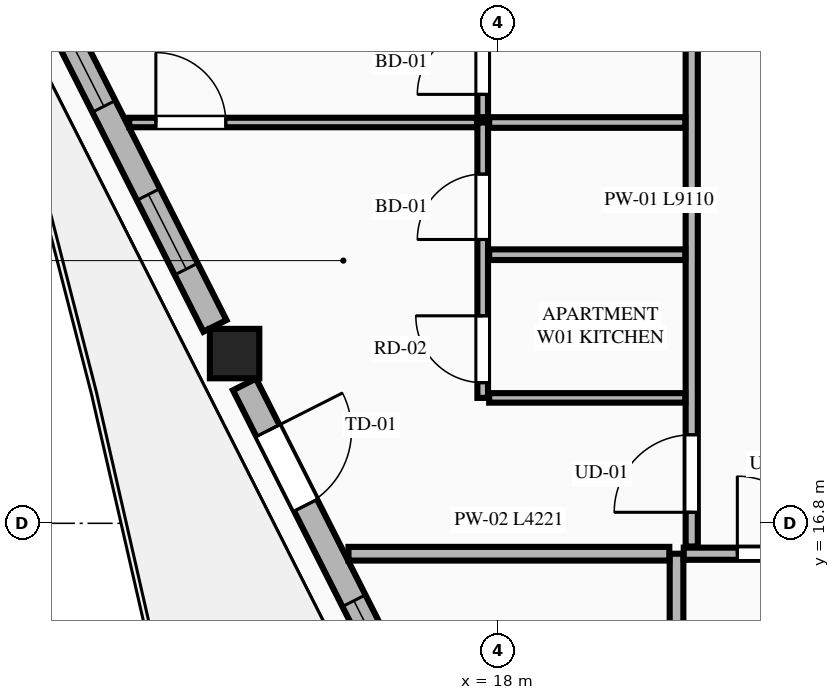
"""IFC4 building model, lengths in metres.
Left out: names, types, materials, properties, quantities, classifications, styles, units other than length and angle.
Written with IfcOpenShell. Run it as: python <this file> out.ifc"""

import sys

from ifc_helpers import new_model, si_unit, direction, frame, frame_2d, origin, origin_2d, place, context, subcontext, project, spatial, rectangle, extrude, element, fill, save


model = new_model("IFC4")
c1 = context("Model", 3, precision=1e-05, world=origin(), true_north=direction((0.0, 1.0)))
c2 = subcontext(c1, "Body", "Model", "MODEL_VIEW")
j1 = project(units=[si_unit("LENGTHUNIT", "METRE"), si_unit("PLANEANGLEUNIT", "RADIAN")], contexts=[c1])
p1 = place(None, origin())
s1 = spatial("IfcSite", under=j1, at=p1, CompositionType="ELEMENT")
p2 = place(p1, origin())
s2 = spatial("IfcBuilding", under=s1, at=p2, CompositionType="ELEMENT")
p3 = place(p2, frame((0.0, 0.0, 283.5)))
s3 = spatial("IfcBuildingStorey", under=s2, at=p3, CompositionType="ELEMENT", Elevation=283.5)
p4 = place(p3, frame((14.536, 19.033, 0.0), z_axis=(0.0, 0.0, 1.0), x_axis=(1.0, 0.0, 0.0)))
e1 = element("IfcColumn", 1, at=p4, inside=s3, PredefinedType="COLUMN", context=c2, shape_type="SweptSolid", body=[
    extrude(rectangle(XDim=0.65, YDim=0.65, at=origin_2d()), origin(), (0.0, 0.0, 1.0), 4.0),
])
p5 = place(p3, frame((12.232, 23.439, 0.0), z_axis=(0.0, 0.0, 1.0), x_axis=(0.45147697324, -0.892282770558, 0.0)))
e2 = element("IfcWall", 2, at=p5, inside=s3, PredefinedType="STANDARD", context=c2, shape_type="SweptSolid", body=[
    extrude(rectangle(XDim=4.53, YDim=0.34, at=frame_2d((2.265, 0.0))), origin(), (0.0, 0.0, 1.0), 2.99),
])
p6 = place(p5, frame((0.22, 0.0, 0.75)))
e3 = element("IfcOpeningElement", 3, at=p6, cuts=e2, PredefinedType="OPENING", context=c2, shape_type="SweptSolid", body=[
    extrude(rectangle(XDim=1.073, YDim=2.0, at=frame_2d((0.537, 1.0))), frame((0.0, 0.18, 0.0), z_axis=(0.0, -1.0, 0.0), x_axis=(1.0, 0.0, 0.0)), (0.0, 0.0, 1.0), 0.36),
])
p7 = place(p5, frame((2.592, 0.0, 0.75)))
e4 = element("IfcOpeningElement", 4, at=p7, cuts=e2, PredefinedType="OPENING", context=c2, shape_type="SweptSolid", body=[
    extrude(rectangle(XDim=1.1, YDim=2.0, at=frame_2d((0.55, 1.0))), frame((0.0, 0.18, 0.0), z_axis=(0.0, -1.0, 0.0), x_axis=(1.0, 0.0, 0.0)), (0.0, 0.0, 1.0), 0.36),
])
p8 = place(p3, frame((14.666, 18.627, 0.0), z_axis=(0.0, 0.0, 1.0), x_axis=(0.451468341582, -0.892287137949, 0.0)))
e5 = element("IfcWall", 5, at=p8, inside=s3, PredefinedType="STANDARD", context=c2, shape_type="SweptSolid", body=[
    extrude(rectangle(XDim=4.723, YDim=0.34, at=frame_2d((2.361, 0.0))), origin(), (0.0, 0.0, 1.0), 2.99),
])
p9 = place(p8, frame((0.682, 0.0, 0.0)))
e6 = element("IfcOpeningElement", 6, at=p9, cuts=e5, PredefinedType="OPENING", context=c2, shape_type="SweptSolid", body=[
    extrude(rectangle(XDim=1.1, YDim=2.25, at=frame_2d((0.55, 1.125))), frame((0.0, 0.18, 0.0), z_axis=(0.0, -1.0, 0.0), x_axis=(1.0, 0.0, 0.0)), (0.0, 0.0, 1.0), 0.36),
])
p10 = place(p8, frame((3.189, 0.0, 0.75)))
e7 = element("IfcOpeningElement", 7, at=p10, cuts=e5, PredefinedType="OPENING", context=c2, shape_type="SweptSolid", body=[
    extrude(rectangle(XDim=1.1, YDim=2.0, at=frame_2d((0.55, 1.0))), frame((0.0, 0.18, 0.0), z_axis=(0.0, -1.0, 0.0), x_axis=(1.0, 0.0, 0.0)), (0.0, 0.0, 1.0), 0.36),
])
p11 = place(p3, frame((20.35, 8.119, 0.0), z_axis=(0.0, 0.0, 1.0), x_axis=(0.0, 1.0, 0.0)))
e8 = element("IfcWall", 8, at=p11, inside=s3, PredefinedType="PARTITIONING", context=c2, shape_type="SweptSolid", body=[
    extrude(rectangle(XDim=8.281, YDim=0.18, at=frame_2d((4.141, 0.0))), origin(), (0.0, 0.0, 1.0), 3.8),
])
p12 = place(p3, frame((20.445, 16.4, 0.0), z_axis=(0.0, 0.0, 1.0), x_axis=(1.0, 0.0, 0.0)))
e9 = element("IfcWall", 9, at=p12, inside=s3, PredefinedType="PARTITIONING", context=c2, shape_type="SweptSolid", body=[
    extrude(rectangle(XDim=8.606, YDim=0.16, at=frame_2d((4.303, 0.0))), origin(), (0.0, 0.0, 1.0), 3.8),
])
p13 = place(p12, frame((0.705, 0.0, 0.0)))
e10 = element("IfcOpeningElement", 10, at=p13, cuts=e9, PredefinedType="OPENING", context=c2, shape_type="SweptSolid", body=[
    extrude(rectangle(XDim=1.02, YDim=2.25, at=frame_2d((0.51, 1.125))), frame((0.0, 0.09, 0.0), z_axis=(0.0, -1.0, 0.0), x_axis=(1.0, 0.0, 0.0)), (0.0, 0.0, 1.0), 0.18),
])
p14 = place(p3, frame((16.034, 16.4, 0.0), z_axis=(0.0, 0.0, 1.0), x_axis=(1.0, 0.0, 0.0)))
e11 = element("IfcWall", 11, at=p14, inside=s3, PredefinedType="PARTITIONING", context=c2, shape_type="SweptSolid", body=[
    extrude(rectangle(XDim=4.221, YDim=0.18, at=frame_2d((2.11, 0.0))), origin(), (0.0, 0.0, 1.0), 3.8),
])
p15 = place(p3, frame((20.55, 16.495, 0.0), z_axis=(0.0, 0.0, 1.0), x_axis=(0.0, 1.0, 0.0)))
e12 = element("IfcWall", 12, at=p15, inside=s3, PredefinedType="PARTITIONING", context=c2, shape_type="SweptSolid", body=[
    extrude(rectangle(XDim=9.11, YDim=0.16, at=frame_2d((4.555, 0.0))), origin(), (0.0, 0.0, 1.0), 3.487),
])
p16 = place(p15, frame((0.45, 0.0, 0.0)))
e13 = element("IfcOpeningElement", 13, at=p16, cuts=e12, PredefinedType="OPENING", context=c2, shape_type="SweptSolid", body=[
    extrude(rectangle(XDim=1.02, YDim=2.25, at=frame_2d((0.51, 1.125))), frame((0.0, 0.09, 0.0), z_axis=(0.0, -1.0, 0.0), x_axis=(1.0, 0.0, 0.0)), (0.0, 0.0, 1.0), 0.18),
])
p17 = place(p3, frame((17.885, 18.45, 0.0), z_axis=(0.0, 0.0, 1.0), x_axis=(1.0, 0.0, 0.0)))
e14 = element("IfcWall", 14, at=p17, inside=s3, PredefinedType="PARTITIONING", context=c2, shape_type="SweptSolid", body=[
    extrude(rectangle(XDim=2.58, YDim=0.125, at=frame_2d((1.29, 0.0))), origin(), (0.0, 0.0, 1.0), 3.8),
])
p18 = place(p3, frame((17.8, 18.45, 0.0), z_axis=(0.0, 0.0, 1.0), x_axis=(0.0, 1.0, 0.0)))
e15 = element("IfcWall", 15, at=p18, inside=s3, PredefinedType="PLUMBINGWALL", context=c2, shape_type="SweptSolid", body=[
    extrude(rectangle(XDim=3.623, YDim=0.14, at=frame_2d((1.812, 0.0))), origin(), (0.0, 0.0, 1.0), 3.8),
])
p19 = place(p18, frame((0.2, 0.0, 0.0)))
e16 = element("IfcOpeningElement", 16, at=p19, cuts=e15, PredefinedType="OPENING", context=c2, shape_type="SweptSolid", body=[
    extrude(rectangle(XDim=0.88, YDim=2.15, at=frame_2d((0.44, 1.075))), frame((0.0, 0.08, 0.0), z_axis=(0.0, -1.0, 0.0), x_axis=(1.0, 0.0, 0.0)), (0.0, 0.0, 1.0), 0.16),
])
p20 = place(p18, frame((2.084, 0.0, 0.0)))
e17 = element("IfcOpeningElement", 17, at=p20, cuts=e15, PredefinedType="OPENING", context=c2, shape_type="SweptSolid", body=[
    extrude(rectangle(XDim=0.86, YDim=2.1, at=frame_2d((0.43, 1.05))), frame((0.0, 0.08, 0.0), z_axis=(0.0, -1.0, 0.0), x_axis=(1.0, 0.0, 0.0)), (0.0, 0.0, 1.0), 0.16),
])
p21 = place(p3, frame((17.8, 22.143, 0.0), z_axis=(0.0, 0.0, 1.0), x_axis=(0.0, 1.0, 0.0)))
e18 = element("IfcWall", 18, at=p21, inside=s3, PredefinedType="PLUMBINGWALL", context=c2, shape_type="SweptSolid", body=[
    extrude(rectangle(XDim=3.462, YDim=0.14, at=frame_2d((1.731, 0.0))), origin(), (0.0, 0.0, 1.0), 3.8),
])
p22 = place(p21, frame((0.3, 0.0, 0.0)))
e19 = element("IfcOpeningElement", 19, at=p22, cuts=e18, PredefinedType="OPENING", context=c2, shape_type="SweptSolid", body=[
    extrude(rectangle(XDim=0.86, YDim=2.1, at=frame_2d((0.43, 1.05))), frame((0.0, 0.08, 0.0), z_axis=(0.0, -1.0, 0.0), x_axis=(1.0, 0.0, 0.0)), (0.0, 0.0, 1.0), 0.16),
])
p23 = place(p3, frame((17.885, 22.073, 0.0), z_axis=(0.0, 0.0, 1.0), x_axis=(1.0, 0.0, 0.0)))
e20 = element("IfcWall", 20, at=p23, inside=s3, PredefinedType="PLUMBINGWALL", context=c2, shape_type="SweptSolid", body=[
    extrude(rectangle(XDim=2.58, YDim=0.14, at=frame_2d((1.29, 0.0))), origin(), (0.0, 0.0, 1.0), 3.8),
])
p24 = place(p3, frame((13.15, 22.073, 0.0), z_axis=(0.0, 0.0, 1.0), x_axis=(1.0, 0.0, 0.0)))
e21 = element("IfcWall", 21, at=p24, inside=s3, PredefinedType="PARTITIONING", context=c2, shape_type="SweptSolid", body=[
    extrude(rectangle(XDim=4.575, YDim=0.125, at=frame_2d((2.288, 0.0))), origin(), (0.0, 0.0, 1.0), 3.8),
])
p25 = place(p24, frame((0.35, 0.0, 0.0)))
e22 = element("IfcOpeningElement", 22, at=p25, cuts=e21, PredefinedType="OPENING", context=c2, shape_type="SweptSolid", body=[
    extrude(rectangle(XDim=0.92, YDim=2.15, at=frame_2d((0.46, 1.075))), frame((0.0, 0.073, 0.0), z_axis=(0.0, -1.0, 0.0), x_axis=(1.0, 0.0, 0.0)), (0.0, 0.0, 1.0), 0.145),
])
p26 = place(p3, frame((17.885, 20.334, 0.0), z_axis=(0.0, 0.0, 1.0), x_axis=(1.0, 0.0, 0.0)))
e23 = element("IfcWall", 23, at=p26, inside=s3, PredefinedType="PLUMBINGWALL", context=c2, shape_type="SweptSolid", body=[
    extrude(rectangle(XDim=2.58, YDim=0.14, at=frame_2d((1.29, 0.0))), origin(), (0.0, 0.0, 1.0), 3.8),
])
p27 = place(p6, origin())
e24 = element("IfcWindow", 24, at=p27, inside=s3, PartitioningType="SINGLE_PANEL", PredefinedType="WINDOW", context=c2, shape_type="SweptSolid", body=[
    extrude(rectangle(XDim=1.073, YDim=2.0, at=frame_2d((0.537, 1.0))), frame((0.0, 0.03, 0.0), z_axis=(0.0, -1.0, 0.0), x_axis=(1.0, 0.0, 0.0)), (0.0, 0.0, 1.0), 0.06),
])
fill(e3, e24)
p28 = place(p9, origin())
e25 = element("IfcDoor", 25, at=p28, inside=s3, OperationType="SINGLE_SWING_LEFT", PredefinedType="DOOR", context=c2, shape_type="SweptSolid", body=[
    extrude(rectangle(XDim=1.1, YDim=2.25, at=frame_2d((0.55, 1.125))), frame((0.0, 0.025, 0.0), z_axis=(0.0, -1.0, 0.0), x_axis=(1.0, 0.0, 0.0)), (0.0, 0.0, 1.0), 0.05),
])
fill(e6, e25)
p29 = place(p13, origin())
e26 = element("IfcDoor", 26, at=p29, inside=s3, OperationType="SINGLE_SWING_LEFT", PredefinedType="DOOR", context=c2, shape_type="SweptSolid", body=[
    extrude(rectangle(XDim=1.02, YDim=2.25, at=frame_2d((0.51, 1.125))), frame((0.0, 0.025, 0.0), z_axis=(0.0, -1.0, 0.0), x_axis=(1.0, 0.0, 0.0)), (0.0, 0.0, 1.0), 0.05),
])
fill(e10, e26)
p30 = place(p19, origin())
e27 = element("IfcDoor", 27, at=p30, inside=s3, OperationType="SINGLE_SWING_RIGHT", PredefinedType="DOOR", context=c2, shape_type="SweptSolid", body=[
    extrude(rectangle(XDim=0.88, YDim=2.15, at=frame_2d((0.44, 1.075))), frame((0.0, 0.025, 0.0), z_axis=(0.0, -1.0, 0.0), x_axis=(1.0, 0.0, 0.0)), (0.0, 0.0, 1.0), 0.05),
])
fill(e16, e27)
p31 = place(p20, origin())
e28 = element("IfcDoor", 28, at=p31, inside=s3, OperationType="SINGLE_SWING_LEFT", PredefinedType="DOOR", context=c2, shape_type="SweptSolid", body=[
    extrude(rectangle(XDim=0.86, YDim=2.1, at=frame_2d((0.43, 1.05))), frame((0.0, 0.025, 0.0), z_axis=(0.0, -1.0, 0.0), x_axis=(1.0, 0.0, 0.0)), (0.0, 0.0, 1.0), 0.05),
])
fill(e17, e28)
p32 = place(p22, origin())
e29 = element("IfcDoor", 29, at=p32, inside=s3, OperationType="SINGLE_SWING_LEFT", PredefinedType="DOOR", context=c2, shape_type="SweptSolid", body=[
    extrude(rectangle(XDim=0.86, YDim=2.1, at=frame_2d((0.43, 1.05))), frame((0.0, 0.025, 0.0), z_axis=(0.0, -1.0, 0.0), x_axis=(1.0, 0.0, 0.0)), (0.0, 0.0, 1.0), 0.05),
])
fill(e19, e29)
p33 = place(p16, origin())
e30 = element("IfcDoor", 30, at=p33, inside=s3, OperationType="SINGLE_SWING_LEFT", PredefinedType="DOOR", context=c2, shape_type="SweptSolid", body=[
    extrude(rectangle(XDim=1.02, YDim=2.25, at=frame_2d((0.51, 1.125))), frame((0.0, 0.025, 0.0), z_axis=(0.0, -1.0, 0.0), x_axis=(1.0, 0.0, 0.0)), (0.0, 0.0, 1.0), 0.05),
])
fill(e13, e30)
p34 = place(p25, origin())
e31 = element("IfcDoor", 31, at=p34, inside=s3, OperationType="SINGLE_SWING_LEFT", PredefinedType="DOOR", context=c2, shape_type="SweptSolid", body=[
    extrude(rectangle(XDim=0.92, YDim=2.15, at=frame_2d((0.46, 1.075))), frame((0.0, 0.025, 0.0), z_axis=(0.0, -1.0, 0.0), x_axis=(1.0, 0.0, 0.0)), (0.0, 0.0, 1.0), 0.05),
])
fill(e22, e31)
p35 = place(p7, origin())
e32 = element("IfcWindow", 32, at=p35, inside=s3, PartitioningType="SINGLE_PANEL", PredefinedType="WINDOW", context=c2, shape_type="SweptSolid", body=[
    extrude(rectangle(XDim=1.1, YDim=2.0, at=frame_2d((0.55, 1.0))), frame((0.0, 0.03, 0.0), z_axis=(0.0, -1.0, 0.0), x_axis=(1.0, 0.0, 0.0)), (0.0, 0.0, 1.0), 0.06),
])
fill(e4, e32)
p36 = place(p10, origin())
e33 = element("IfcWindow", 33, at=p36, inside=s3, PartitioningType="SINGLE_PANEL", PredefinedType="WINDOW", context=c2, shape_type="SweptSolid", body=[
    extrude(rectangle(XDim=1.1, YDim=2.0, at=frame_2d((0.55, 1.0))), frame((0.0, 0.03, 0.0), z_axis=(0.0, -1.0, 0.0), x_axis=(1.0, 0.0, 0.0)), (0.0, 0.0, 1.0), 0.06),
])
fill(e7, e33)
save(model, sys.argv[1])
